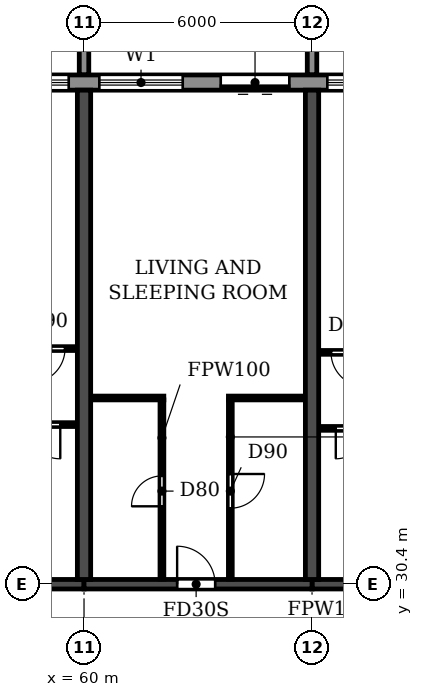
"""IFC4 building model, lengths in metres.
Left out: names, types, materials, properties, quantities, classifications, styles, units other than length and angle.
Written with IfcOpenShell. Run it as: python <this file> out.ifc"""

import sys

from ifc_helpers import new_model, si_unit, direction, frame, frame_2d, origin, place, context, subcontext, project, spatial, polyline, rectangle, outline, extrude, source, transform, mapped, element, fill, save


model = new_model("IFC4")
c1 = context("Model", 3, precision=1e-05, world=origin(), true_north=direction((0.0, 1.0)))
c2 = subcontext(c1, "Body", "Model", "MODEL_VIEW")
j1 = project(units=[si_unit("LENGTHUNIT", "METRE"), si_unit("PLANEANGLEUNIT", "RADIAN")], contexts=[c1])
p1 = place(None, origin())
s1 = spatial("IfcSite", under=j1, at=p1, CompositionType="ELEMENT")
p2 = place(p1, origin())
s2 = spatial("IfcBuilding", under=s1, at=p2, CompositionType="ELEMENT")
p3 = place(p2, frame((0.0, 0.0, 112.5)))
s3 = spatial("IfcBuildingStorey", under=s2, at=p3, CompositionType="ELEMENT", Elevation=112.5)
for number, where, z_axis, x_axis in (
    (1, (60.0, 30.525, 0.0), (0.0, 0.0, 1.0), (0.0, 1.0, 0.0)),
    (2, (66.0, 30.525, 0.0), (0.0, 0.0, 1.0), (0.0, 1.0, 0.0)),
):
    element("IfcWall", number, at=place(p3, frame(where, z_axis=z_axis, x_axis=x_axis)), inside=s3, PredefinedType="SHEAR", context=c2, shape_type="SweptSolid", body=[
        extrude(rectangle(XDim=12.875, YDim=0.35, at=frame_2d((6.438, 0.0))), origin(), (0.0, 0.0, 1.0), 2.95),
    ])
p4 = place(p3, frame((54.0, 30.4, 0.0), z_axis=(0.0, 0.0, 1.0), x_axis=(1.0, 0.0, 0.0)))
e3 = element("IfcWall", 3, at=p4, inside=s3, PredefinedType="SHEAR", context=c2, shape_type="SweptSolid", body=[
    extrude(rectangle(XDim=6.0, YDim=0.25, at=frame_2d((3.0, 0.0))), origin(), (0.0, 0.0, 1.0), 2.35),
])
p5 = place(p4, frame((2.45, 0.0, 0.0)))
e4 = element("IfcOpeningElement", 4, at=p5, cuts=e3, PredefinedType="OPENING", context=c2, shape_type="SweptSolid", body=[
    extrude(rectangle(XDim=1.0, YDim=2.1, at=frame_2d((0.5, 1.05))), frame((0.0, 0.135, 0.0), z_axis=(0.0, -1.0, 0.0), x_axis=(1.0, 0.0, 0.0)), (0.0, 0.0, 1.0), 0.27),
])
p6 = place(p3, frame((60.0, 30.4, 0.0), z_axis=(0.0, 0.0, 1.0), x_axis=(1.0, 0.0, 0.0)))
e5 = element("IfcWall", 5, at=p6, inside=s3, PredefinedType="SHEAR", context=c2, shape_type="SweptSolid", body=[
    extrude(rectangle(XDim=6.0, YDim=0.25, at=frame_2d((3.0, 0.0))), origin(), (0.0, 0.0, 1.0), 2.35),
])
p7 = place(p6, frame((2.45, 0.0, 0.0)))
e6 = element("IfcOpeningElement", 6, at=p7, cuts=e5, PredefinedType="OPENING", context=c2, shape_type="SweptSolid", body=[
    extrude(rectangle(XDim=1.0, YDim=2.1, at=frame_2d((0.5, 1.05))), frame((0.0, 0.135, 0.0), z_axis=(0.0, -1.0, 0.0), x_axis=(1.0, 0.0, 0.0)), (0.0, 0.0, 1.0), 0.27),
])
p8 = place(p3, frame((66.0, 30.4, 0.0), z_axis=(0.0, 0.0, 1.0), x_axis=(1.0, 0.0, 0.0)))
e7 = element("IfcWall", 7, at=p8, inside=s3, PredefinedType="SHEAR", context=c2, shape_type="SweptSolid", body=[
    extrude(rectangle(XDim=6.0, YDim=0.25, at=frame_2d((3.0, 0.0))), origin(), (0.0, 0.0, 1.0), 2.35),
])
p9 = place(p8, frame((2.45, 0.0, 0.0)))
e8 = element("IfcOpeningElement", 8, at=p9, cuts=e7, PredefinedType="OPENING", context=c2, shape_type="SweptSolid", body=[
    extrude(rectangle(XDim=1.0, YDim=2.1, at=frame_2d((0.5, 1.05))), frame((0.0, 0.135, 0.0), z_axis=(0.0, -1.0, 0.0), x_axis=(1.0, 0.0, 0.0)), (0.0, 0.0, 1.0), 0.27),
])
p10 = place(p3, frame((85.317, 43.6, 0.0), z_axis=(0.0, 0.0, 1.0), x_axis=(-1.0, 0.0, 0.0)))
e9 = element("IfcWall", 9, at=p10, inside=s3, PredefinedType="STANDARD", context=c2, shape_type="SweptSolid", body=[
    extrude(rectangle(XDim=68.634, YDim=0.4, at=frame_2d((34.317, 0.0))), origin(), (0.0, 0.0, 1.0), 2.95),
])
p11 = place(p10, frame((64.917, 0.0, 0.0)))
e10 = element("IfcOpeningElement", 10, at=p11, cuts=e9, PredefinedType="OPENING", context=c2, shape_type="SweptSolid", body=[
    extrude(rectangle(XDim=1.8, YDim=2.4, at=frame_2d((0.9, 1.2))), frame((0.0, 0.21, 0.0), z_axis=(0.0, -1.0, 0.0), x_axis=(1.0, 0.0, 0.0)), (0.0, 0.0, 1.0), 0.42),
])
p12 = place(p10, frame((61.717, 0.0, 0.9)))
e11 = element("IfcOpeningElement", 11, at=p12, cuts=e9, PredefinedType="OPENING", context=c2, shape_type="SweptSolid", body=[
    extrude(rectangle(XDim=2.2, YDim=1.5, at=frame_2d((1.1, 0.75))), frame((0.0, 0.21, 0.0), z_axis=(0.0, -1.0, 0.0), x_axis=(1.0, 0.0, 0.0)), (0.0, 0.0, 1.0), 0.42),
])
p13 = place(p10, frame((58.717, 0.0, 0.9)))
e12 = element("IfcOpeningElement", 12, at=p13, cuts=e9, PredefinedType="OPENING", context=c2, shape_type="SweptSolid", body=[
    extrude(rectangle(XDim=2.2, YDim=1.5, at=frame_2d((1.1, 0.75))), frame((0.0, 0.21, 0.0), z_axis=(0.0, -1.0, 0.0), x_axis=(1.0, 0.0, 0.0)), (0.0, 0.0, 1.0), 0.42),
])
p14 = place(p10, frame((55.917, 0.0, 0.0)))
e13 = element("IfcOpeningElement", 13, at=p14, cuts=e9, PredefinedType="OPENING", context=c2, shape_type="SweptSolid", body=[
    extrude(rectangle(XDim=1.8, YDim=2.4, at=frame_2d((0.9, 1.2))), frame((0.0, 0.21, 0.0), z_axis=(0.0, -1.0, 0.0), x_axis=(1.0, 0.0, 0.0)), (0.0, 0.0, 1.0), 0.42),
])
p15 = place(p10, frame((52.917, 0.0, 0.0)))
e14 = element("IfcOpeningElement", 14, at=p15, cuts=e9, PredefinedType="OPENING", context=c2, shape_type="SweptSolid", body=[
    extrude(rectangle(XDim=1.8, YDim=2.4, at=frame_2d((0.9, 1.2))), frame((0.0, 0.21, 0.0), z_axis=(0.0, -1.0, 0.0), x_axis=(1.0, 0.0, 0.0)), (0.0, 0.0, 1.0), 0.42),
])
p16 = place(p10, frame((49.717, 0.0, 0.9)))
e15 = element("IfcOpeningElement", 15, at=p16, cuts=e9, PredefinedType="OPENING", context=c2, shape_type="SweptSolid", body=[
    extrude(rectangle(XDim=2.2, YDim=1.5, at=frame_2d((1.1, 0.75))), frame((0.0, 0.21, 0.0), z_axis=(0.0, -1.0, 0.0), x_axis=(1.0, 0.0, 0.0)), (0.0, 0.0, 1.0), 0.42),
])
p17 = place(p10, frame((46.717, 0.0, 0.9)))
e16 = element("IfcOpeningElement", 16, at=p17, cuts=e9, PredefinedType="OPENING", context=c2, shape_type="SweptSolid", body=[
    extrude(rectangle(XDim=2.2, YDim=1.5, at=frame_2d((1.1, 0.75))), frame((0.0, 0.21, 0.0), z_axis=(0.0, -1.0, 0.0), x_axis=(1.0, 0.0, 0.0)), (0.0, 0.0, 1.0), 0.42),
])
p18 = place(p10, frame((43.917, 0.0, 0.0)))
e17 = element("IfcOpeningElement", 17, at=p18, cuts=e9, PredefinedType="OPENING", context=c2, shape_type="SweptSolid", body=[
    extrude(rectangle(XDim=1.8, YDim=2.4, at=frame_2d((0.9, 1.2))), frame((0.0, 0.21, 0.0), z_axis=(0.0, -1.0, 0.0), x_axis=(1.0, 0.0, 0.0)), (0.0, 0.0, 1.0), 0.42),
])
p19 = place(p10, frame((40.717, 0.0, 0.9)))
e18 = element("IfcOpeningElement", 18, at=p19, cuts=e9, PredefinedType="OPENING", context=c2, shape_type="SweptSolid", body=[
    extrude(rectangle(XDim=2.2, YDim=1.5, at=frame_2d((1.1, 0.75))), frame((0.0, 0.21, 0.0), z_axis=(0.0, -1.0, 0.0), x_axis=(1.0, 0.0, 0.0)), (0.0, 0.0, 1.0), 0.42),
])
p20 = place(p10, frame((37.717, 0.0, 0.9)))
e19 = element("IfcOpeningElement", 19, at=p20, cuts=e9, PredefinedType="OPENING", context=c2, shape_type="SweptSolid", body=[
    extrude(rectangle(XDim=2.2, YDim=1.5, at=frame_2d((1.1, 0.75))), frame((0.0, 0.21, 0.0), z_axis=(0.0, -1.0, 0.0), x_axis=(1.0, 0.0, 0.0)), (0.0, 0.0, 1.0), 0.42),
])
p21 = place(p10, frame((34.917, 0.0, 0.0)))
e20 = element("IfcOpeningElement", 20, at=p21, cuts=e9, PredefinedType="OPENING", context=c2, shape_type="SweptSolid", body=[
    extrude(rectangle(XDim=1.8, YDim=2.4, at=frame_2d((0.9, 1.2))), frame((0.0, 0.21, 0.0), z_axis=(0.0, -1.0, 0.0), x_axis=(1.0, 0.0, 0.0)), (0.0, 0.0, 1.0), 0.42),
])
p22 = place(p10, frame((31.717, 0.0, 0.9)))
e21 = element("IfcOpeningElement", 21, at=p22, cuts=e9, PredefinedType="OPENING", context=c2, shape_type="SweptSolid", body=[
    extrude(rectangle(XDim=2.2, YDim=1.5, at=frame_2d((1.1, 0.75))), frame((0.0, 0.21, 0.0), z_axis=(0.0, -1.0, 0.0), x_axis=(1.0, 0.0, 0.0)), (0.0, 0.0, 1.0), 0.42),
])
p23 = place(p10, frame((28.917, 0.0, 0.0)))
e22 = element("IfcOpeningElement", 22, at=p23, cuts=e9, PredefinedType="OPENING", context=c2, shape_type="SweptSolid", body=[
    extrude(rectangle(XDim=1.8, YDim=2.4, at=frame_2d((0.9, 1.2))), frame((0.0, 0.21, 0.0), z_axis=(0.0, -1.0, 0.0), x_axis=(1.0, 0.0, 0.0)), (0.0, 0.0, 1.0), 0.42),
])
p24 = place(p10, frame((25.717, 0.0, 0.9)))
e23 = element("IfcOpeningElement", 23, at=p24, cuts=e9, PredefinedType="OPENING", context=c2, shape_type="SweptSolid", body=[
    extrude(rectangle(XDim=2.2, YDim=1.5, at=frame_2d((1.1, 0.75))), frame((0.0, 0.21, 0.0), z_axis=(0.0, -1.0, 0.0), x_axis=(1.0, 0.0, 0.0)), (0.0, 0.0, 1.0), 0.42),
])
p25 = place(p10, frame((22.717, 0.0, 0.9)))
e24 = element("IfcOpeningElement", 24, at=p25, cuts=e9, PredefinedType="OPENING", context=c2, shape_type="SweptSolid", body=[
    extrude(rectangle(XDim=2.2, YDim=1.5, at=frame_2d((1.1, 0.75))), frame((0.0, 0.21, 0.0), z_axis=(0.0, -1.0, 0.0), x_axis=(1.0, 0.0, 0.0)), (0.0, 0.0, 1.0), 0.42),
])
p26 = place(p10, frame((19.917, 0.0, 0.0)))
e25 = element("IfcOpeningElement", 25, at=p26, cuts=e9, PredefinedType="OPENING", context=c2, shape_type="SweptSolid", body=[
    extrude(rectangle(XDim=1.8, YDim=2.4, at=frame_2d((0.9, 1.2))), frame((0.0, 0.21, 0.0), z_axis=(0.0, -1.0, 0.0), x_axis=(1.0, 0.0, 0.0)), (0.0, 0.0, 1.0), 0.42),
])
p27 = place(p10, frame((16.717, 0.0, 0.9)))
e26 = element("IfcOpeningElement", 26, at=p27, cuts=e9, PredefinedType="OPENING", context=c2, shape_type="SweptSolid", body=[
    extrude(rectangle(XDim=2.2, YDim=1.5, at=frame_2d((1.1, 0.75))), frame((0.0, 0.21, 0.0), z_axis=(0.0, -1.0, 0.0), x_axis=(1.0, 0.0, 0.0)), (0.0, 0.0, 1.0), 0.42),
])
p28 = place(p10, frame((13.917, 0.0, 0.0)))
e27 = element("IfcOpeningElement", 27, at=p28, cuts=e9, PredefinedType="OPENING", context=c2, shape_type="SweptSolid", body=[
    extrude(rectangle(XDim=1.8, YDim=2.4, at=frame_2d((0.9, 1.2))), frame((0.0, 0.21, 0.0), z_axis=(0.0, -1.0, 0.0), x_axis=(1.0, 0.0, 0.0)), (0.0, 0.0, 1.0), 0.42),
])
p29 = place(p10, frame((10.717, 0.0, 0.9)))
e28 = element("IfcOpeningElement", 28, at=p29, cuts=e9, PredefinedType="OPENING", context=c2, shape_type="SweptSolid", body=[
    extrude(rectangle(XDim=2.2, YDim=1.5, at=frame_2d((1.1, 0.75))), frame((0.0, 0.21, 0.0), z_axis=(0.0, -1.0, 0.0), x_axis=(1.0, 0.0, 0.0)), (0.0, 0.0, 1.0), 0.42),
])
p30 = place(p10, frame((7.717, 0.0, 0.9)))
e29 = element("IfcOpeningElement", 29, at=p30, cuts=e9, PredefinedType="OPENING", context=c2, shape_type="SweptSolid", body=[
    extrude(rectangle(XDim=2.2, YDim=1.5, at=frame_2d((1.1, 0.75))), frame((0.0, 0.21, 0.0), z_axis=(0.0, -1.0, 0.0), x_axis=(1.0, 0.0, 0.0)), (0.0, 0.0, 1.0), 0.42),
])
p31 = place(p10, frame((4.917, 0.0, 0.0)))
e30 = element("IfcOpeningElement", 30, at=p31, cuts=e9, PredefinedType="OPENING", context=c2, shape_type="SweptSolid", body=[
    extrude(rectangle(XDim=1.8, YDim=2.4, at=frame_2d((0.9, 1.2))), frame((0.0, 0.21, 0.0), z_axis=(0.0, -1.0, 0.0), x_axis=(1.0, 0.0, 0.0)), (0.0, 0.0, 1.0), 0.42),
])
p32 = place(p10, frame((1.717, 0.0, 0.9)))
e31 = element("IfcOpeningElement", 31, at=p32, cuts=e9, PredefinedType="OPENING", context=c2, shape_type="SweptSolid", body=[
    extrude(rectangle(XDim=2.2, YDim=1.5, at=frame_2d((1.1, 0.75))), frame((0.0, 0.21, 0.0), z_axis=(0.0, -1.0, 0.0), x_axis=(1.0, 0.0, 0.0)), (0.0, 0.0, 1.0), 0.42),
])
m1 = source(origin(), c2, "Body", "SweptSolid", [
    extrude(outline(polyline([(0.0, 0.0), (0.25, 0.0), (0.25, 3.1), (0.0, 3.1), (0.0, 0.0)])), origin(), (0.0, 0.0, 1.0), 3.1),
])
for number, where in (
    (32, (59.875, 43.8, 0.0)),
    (33, (65.875, 43.8, 0.0)),
):
    element("IfcWall", number, at=place(p3, frame(where)), inside=s3, PredefinedType="STANDARD", context=c2, shape_type="MappedRepresentation", body=[
        mapped(m1, transform((0.0, 0.0, 0.0))),
    ])
p33 = place(p3, frame((66.185, 34.5, 0.0), z_axis=(0.0, 0.0, 1.0), x_axis=(1.0, 0.0, 0.0)))
e34 = element("IfcWall", 34, at=p33, inside=s3, PredefinedType="PARTITIONING", context=c2, shape_type="SweptSolid", body=[
    extrude(rectangle(XDim=1.915, YDim=0.1, at=frame_2d((0.958, 0.0))), origin(), (0.0, 0.0, 1.0), 2.95),
])
p34 = place(p33, frame((0.44, 0.0, 0.0)))
e35 = element("IfcOpeningElement", 35, at=p34, cuts=e34, PredefinedType="OPENING", context=c2, shape_type="SweptSolid", body=[
    extrude(rectangle(XDim=0.8, YDim=2.1, at=frame_2d((0.4, 1.05))), frame((0.0, 0.06, 0.0), z_axis=(0.0, -1.0, 0.0), x_axis=(1.0, 0.0, 0.0)), (0.0, 0.0, 1.0), 0.12),
])
p35 = place(p3, frame((57.8, 34.6, 0.0), z_axis=(0.0, 0.0, 1.0), x_axis=(1.0, 0.0, 0.0)))
e36 = element("IfcWall", 36, at=p35, inside=s3, PredefinedType="PARTITIONING", context=c2, shape_type="SweptSolid", body=[
    extrude(rectangle(XDim=2.015, YDim=0.1, at=frame_2d((1.007, 0.0))), origin(), (0.0, 0.0, 1.0), 2.95),
])
p36 = place(p35, frame((0.675, 0.0, 0.0)))
e37 = element("IfcOpeningElement", 37, at=p36, cuts=e36, PredefinedType="OPENING", context=c2, shape_type="SweptSolid", body=[
    extrude(rectangle(XDim=0.9, YDim=2.1, at=frame_2d((0.45, 1.05))), frame((0.0, 0.06, 0.0), z_axis=(0.0, -1.0, 0.0), x_axis=(1.0, 0.0, 0.0)), (0.0, 0.0, 1.0), 0.12),
])
p37 = place(p3, frame((60.185, 35.3, 0.0), z_axis=(0.0, 0.0, 1.0), x_axis=(1.0, 0.0, 0.0)))
e38 = element("IfcWall", 38, at=p37, inside=s3, PredefinedType="PARTITIONING", context=c2, shape_type="SweptSolid", body=[
    extrude(rectangle(XDim=1.915, YDim=0.1, at=frame_2d((0.958, 0.0))), origin(), (0.0, 0.0, 1.0), 2.95),
])
p38 = place(p3, frame((63.8, 35.3, 0.0), z_axis=(0.0, 0.0, 1.0), x_axis=(1.0, 0.0, 0.0)))
e39 = element("IfcWall", 39, at=p38, inside=s3, PredefinedType="PARTITIONING", context=c2, shape_type="SweptSolid", body=[
    extrude(rectangle(XDim=2.015, YDim=0.1, at=frame_2d((1.007, 0.0))), origin(), (0.0, 0.0, 1.0), 2.95),
])
p39 = place(p3, frame((66.185, 36.5, 0.0), z_axis=(0.0, 0.0, 1.0), x_axis=(1.0, 0.0, 0.0)))
e40 = element("IfcWall", 40, at=p39, inside=s3, PredefinedType="PARTITIONING", context=c2, shape_type="SweptSolid", body=[
    extrude(rectangle(XDim=2.865, YDim=0.1, at=frame_2d((1.433, 0.0))), origin(), (0.0, 0.0, 1.0), 2.95),
])
p40 = place(p39, frame((0.315, 0.0, 0.0)))
e41 = element("IfcOpeningElement", 41, at=p40, cuts=e40, PredefinedType="OPENING", context=c2, shape_type="SweptSolid", body=[
    extrude(rectangle(XDim=0.9, YDim=2.1, at=frame_2d((0.45, 1.05))), frame((0.0, 0.06, 0.0), z_axis=(0.0, -1.0, 0.0), x_axis=(1.0, 0.0, 0.0)), (0.0, 0.0, 1.0), 0.12),
])
p41 = place(p3, frame((56.95, 36.6, 0.0), z_axis=(0.0, 0.0, 1.0), x_axis=(1.0, 0.0, 0.0)))
e42 = element("IfcWall", 42, at=p41, inside=s3, PredefinedType="PARTITIONING", context=c2, shape_type="SweptSolid", body=[
    extrude(rectangle(XDim=2.865, YDim=0.1, at=frame_2d((1.433, 0.0))), origin(), (0.0, 0.0, 1.0), 2.95),
])
p42 = place(p41, frame((1.65, 0.0, 0.0)))
e43 = element("IfcOpeningElement", 43, at=p42, cuts=e42, PredefinedType="OPENING", context=c2, shape_type="SweptSolid", body=[
    extrude(rectangle(XDim=0.9, YDim=2.1, at=frame_2d((0.45, 1.05))), frame((0.0, 0.06, 0.0), z_axis=(0.0, -1.0, 0.0), x_axis=(1.0, 0.0, 0.0)), (0.0, 0.0, 1.0), 0.12),
])
p43 = place(p3, frame((62.05, 30.535, 0.0), z_axis=(0.0, 0.0, 1.0), x_axis=(0.0, 1.0, 0.0)))
e44 = element("IfcWall", 44, at=p43, inside=s3, PredefinedType="PARTITIONING", context=c2, shape_type="SweptSolid", body=[
    extrude(rectangle(XDim=4.715, YDim=0.1, at=frame_2d((2.357, 0.0))), origin(), (0.0, 0.0, 1.0), 2.95),
])
p44 = place(p43, frame((1.915, 0.0, 0.0)))
e45 = element("IfcOpeningElement", 45, at=p44, cuts=e44, PredefinedType="OPENING", context=c2, shape_type="SweptSolid", body=[
    extrude(rectangle(XDim=0.8, YDim=2.1, at=frame_2d((0.4, 1.05))), frame((0.0, 0.06, 0.0), z_axis=(0.0, -1.0, 0.0), x_axis=(1.0, 0.0, 0.0)), (0.0, 0.0, 1.0), 0.12),
])
p45 = place(p3, frame((63.85, 30.535, 0.0), z_axis=(0.0, 0.0, 1.0), x_axis=(0.0, 1.0, 0.0)))
e46 = element("IfcWall", 46, at=p45, inside=s3, PredefinedType="PARTITIONING", context=c2, shape_type="SweptSolid", body=[
    extrude(rectangle(XDim=4.715, YDim=0.1, at=frame_2d((2.357, 0.0))), origin(), (0.0, 0.0, 1.0), 2.95),
])
p46 = place(p45, frame((1.865, 0.0, 0.0)))
e47 = element("IfcOpeningElement", 47, at=p46, cuts=e46, PredefinedType="OPENING", context=c2, shape_type="SweptSolid", body=[
    extrude(rectangle(XDim=0.9, YDim=2.1, at=frame_2d((0.45, 1.05))), frame((0.0, 0.06, 0.0), z_axis=(0.0, -1.0, 0.0), x_axis=(1.0, 0.0, 0.0)), (0.0, 0.0, 1.0), 0.12),
])
p47 = place(p24, origin())
e48 = element("IfcWindow", 48, at=p47, inside=s3, PartitioningType="DOUBLE_PANEL_HORIZONTAL", PredefinedType="WINDOW", context=c2, shape_type="SweptSolid", body=[
    extrude(rectangle(XDim=2.2, YDim=1.5, at=frame_2d((1.1, 0.75))), frame((0.0, 0.03, 0.0), z_axis=(0.0, -1.0, 0.0), x_axis=(1.0, 0.0, 0.0)), (0.0, 0.0, 1.0), 0.06),
])
fill(e23, e48)
p48 = place(p25, origin())
e49 = element("IfcWindow", 49, at=p48, inside=s3, PartitioningType="DOUBLE_PANEL_HORIZONTAL", PredefinedType="WINDOW", context=c2, shape_type="SweptSolid", body=[
    extrude(rectangle(XDim=2.2, YDim=1.5, at=frame_2d((1.1, 0.75))), frame((0.0, 0.03, 0.0), z_axis=(0.0, -1.0, 0.0), x_axis=(1.0, 0.0, 0.0)), (0.0, 0.0, 1.0), 0.06),
])
fill(e24, e49)
p49 = place(p26, origin())
e50 = element("IfcDoor", 50, at=p49, inside=s3, OperationType="DOUBLE_DOOR_SLIDING", PredefinedType="DOOR", context=c2, shape_type="SweptSolid", body=[
    extrude(rectangle(XDim=1.8, YDim=2.4, at=frame_2d((0.9, 1.2))), frame((0.0, 0.025, 0.0), z_axis=(0.0, -1.0, 0.0), x_axis=(1.0, 0.0, 0.0)), (0.0, 0.0, 1.0), 0.05),
])
fill(e25, e50)
p50 = place(p27, origin())
e51 = element("IfcWindow", 51, at=p50, inside=s3, PartitioningType="DOUBLE_PANEL_HORIZONTAL", PredefinedType="WINDOW", context=c2, shape_type="SweptSolid", body=[
    extrude(rectangle(XDim=2.2, YDim=1.5, at=frame_2d((1.1, 0.75))), frame((0.0, 0.03, 0.0), z_axis=(0.0, -1.0, 0.0), x_axis=(1.0, 0.0, 0.0)), (0.0, 0.0, 1.0), 0.06),
])
fill(e26, e51)
p51 = place(p36, frame((0.9, 0.0, 0.0), z_axis=(0.0, 0.0, 1.0), x_axis=(-1.0, 0.0, 0.0)))
e52 = element("IfcDoor", 52, at=p51, inside=s3, OperationType="SINGLE_SWING_LEFT", PredefinedType="DOOR", context=c2, shape_type="SweptSolid", body=[
    extrude(rectangle(XDim=0.9, YDim=2.1, at=frame_2d((0.45, 1.05))), frame((0.0, 0.025, 0.0), z_axis=(0.0, -1.0, 0.0), x_axis=(1.0, 0.0, 0.0)), (0.0, 0.0, 1.0), 0.05),
])
fill(e37, e52)
p52 = place(p42, frame((0.9, 0.0, 0.0), z_axis=(0.0, 0.0, 1.0), x_axis=(-1.0, 0.0, 0.0)))
e53 = element("IfcDoor", 53, at=p52, inside=s3, OperationType="SINGLE_SWING_RIGHT", PredefinedType="DOOR", context=c2, shape_type="SweptSolid", body=[
    extrude(rectangle(XDim=0.9, YDim=2.1, at=frame_2d((0.45, 1.05))), frame((0.0, 0.025, 0.0), z_axis=(0.0, -1.0, 0.0), x_axis=(1.0, 0.0, 0.0)), (0.0, 0.0, 1.0), 0.05),
])
fill(e43, e53)
p53 = place(p44, origin())
e54 = element("IfcDoor", 54, at=p53, inside=s3, OperationType="SINGLE_SWING_LEFT", PredefinedType="DOOR", context=c2, shape_type="SweptSolid", body=[
    extrude(rectangle(XDim=0.8, YDim=2.1, at=frame_2d((0.4, 1.05))), frame((0.0, 0.025, 0.0), z_axis=(0.0, -1.0, 0.0), x_axis=(1.0, 0.0, 0.0)), (0.0, 0.0, 1.0), 0.05),
])
fill(e45, e54)
p54 = place(p7, origin())
e55 = element("IfcDoor", 55, at=p54, inside=s3, OperationType="SINGLE_SWING_LEFT", PredefinedType="DOOR", context=c2, shape_type="SweptSolid", body=[
    extrude(rectangle(XDim=1.0, YDim=2.1, at=frame_2d((0.5, 1.05))), frame((0.0, 0.025, 0.0), z_axis=(0.0, -1.0, 0.0), x_axis=(1.0, 0.0, 0.0)), (0.0, 0.0, 1.0), 0.05),
])
fill(e6, e55)
p55 = place(p46, frame((0.9, 0.0, 0.0), z_axis=(0.0, 0.0, 1.0), x_axis=(-1.0, 0.0, 0.0)))
e56 = element("IfcDoor", 56, at=p55, inside=s3, OperationType="SINGLE_SWING_LEFT", PredefinedType="DOOR", context=c2, shape_type="SweptSolid", body=[
    extrude(rectangle(XDim=0.9, YDim=2.1, at=frame_2d((0.45, 1.05))), frame((0.0, 0.025, 0.0), z_axis=(0.0, -1.0, 0.0), x_axis=(1.0, 0.0, 0.0)), (0.0, 0.0, 1.0), 0.05),
])
fill(e47, e56)
p56 = place(p40, frame((0.9, 0.0, 0.0), z_axis=(0.0, 0.0, 1.0), x_axis=(-1.0, 0.0, 0.0)))
e57 = element("IfcDoor", 57, at=p56, inside=s3, OperationType="SINGLE_SWING_LEFT", PredefinedType="DOOR", context=c2, shape_type="SweptSolid", body=[
    extrude(rectangle(XDim=0.9, YDim=2.1, at=frame_2d((0.45, 1.05))), frame((0.0, 0.025, 0.0), z_axis=(0.0, -1.0, 0.0), x_axis=(1.0, 0.0, 0.0)), (0.0, 0.0, 1.0), 0.05),
])
fill(e41, e57)
p57 = place(p34, frame((0.8, 0.0, 0.0), z_axis=(0.0, 0.0, 1.0), x_axis=(-1.0, 0.0, 0.0)))
e58 = element("IfcDoor", 58, at=p57, inside=s3, OperationType="SINGLE_SWING_RIGHT", PredefinedType="DOOR", context=c2, shape_type="SweptSolid", body=[
    extrude(rectangle(XDim=0.8, YDim=2.1, at=frame_2d((0.4, 1.05))), frame((0.0, 0.025, 0.0), z_axis=(0.0, -1.0, 0.0), x_axis=(1.0, 0.0, 0.0)), (0.0, 0.0, 1.0), 0.05),
])
fill(e35, e58)
save(model, sys.argv[1])
